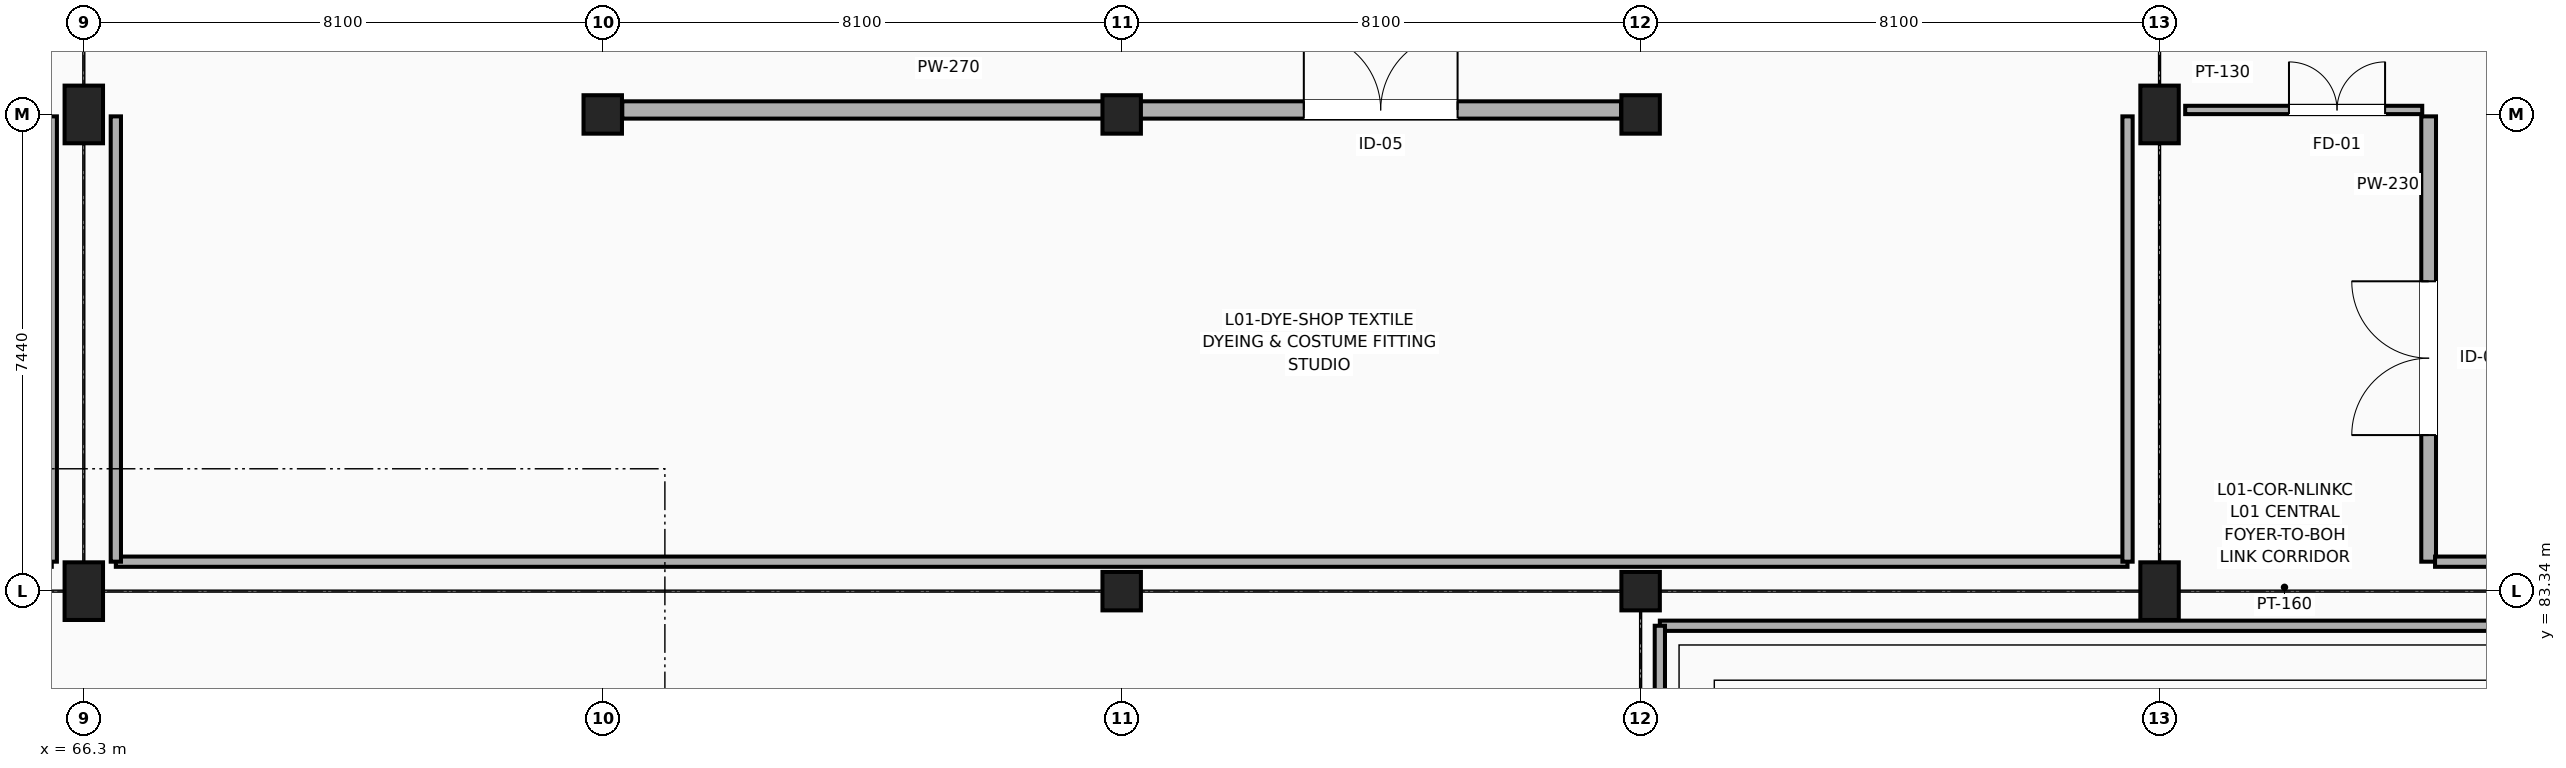
"""IFC4 building model, lengths in metres.
Left out: names, types, materials, properties, quantities, classifications, styles, units other than length and angle.
Written with IfcOpenShell. Run it as: python <this file> out.ifc"""

import sys

from ifc_helpers import new_model, si_unit, direction, frame, frame_2d, origin, origin_2d, place, context, subcontext, project, spatial, rectangle, extrude, element, fill, save


model = new_model("IFC4")
c1 = context("Model", 3, precision=1e-05, world=origin(), true_north=direction((0.0, 1.0)))
c2 = subcontext(c1, "Body", "Model", "MODEL_VIEW")
j1 = project(units=[si_unit("LENGTHUNIT", "METRE"), si_unit("PLANEANGLEUNIT", "RADIAN")], contexts=[c1])
p1 = place(None, origin())
s1 = spatial("IfcSite", under=j1, at=p1, CompositionType="ELEMENT")
p2 = place(p1, origin())
s2 = spatial("IfcBuilding", under=s1, at=p2, CompositionType="ELEMENT")
p3 = place(p2, frame((0.0, 0.0, 5.4)))
s3 = spatial("IfcBuildingStorey", under=s2, at=p3, CompositionType="ELEMENT", Elevation=5.4)
for number, where, z_axis, x_axis in (
    (1, (66.3, 83.34, 0.0), (0.0, 0.0, 1.0), (1.0, 0.0, 0.0)),
    (2, (66.3, 90.78, 0.0), (0.0, 0.0, 1.0), (1.0, 0.0, 0.0)),
):
    element("IfcColumn", number, at=place(p3, frame(where, z_axis=z_axis, x_axis=x_axis)), inside=s3, PredefinedType="COLUMN", context=c2, shape_type="SweptSolid", body=[
        extrude(rectangle(XDim=0.6, YDim=0.9, at=origin_2d()), origin(), (0.0, 0.0, 1.0), 4.8),
    ])
for number, where, z_axis, x_axis in (
    (3, (74.4, 90.78, 0.0), (0.0, 0.0, 1.0), (1.0, 0.0, 0.0)),
    (4, (82.5, 83.34, 0.0), (0.0, 0.0, 1.0), (1.0, 0.0, 0.0)),
    (5, (82.5, 90.78, 0.0), (0.0, 0.0, 1.0), (1.0, 0.0, 0.0)),
    (6, (90.6, 83.34, 0.0), (0.0, 0.0, 1.0), (1.0, 0.0, 0.0)),
    (7, (90.6, 90.78, 0.0), (0.0, 0.0, 1.0), (1.0, 0.0, 0.0)),
):
    element("IfcColumn", number, at=place(p3, frame(where, z_axis=z_axis, x_axis=x_axis)), inside=s3, PredefinedType="COLUMN", context=c2, shape_type="SweptSolid", body=[
        extrude(rectangle(XDim=0.6, YDim=0.6, at=origin_2d()), origin(), (0.0, 0.0, 1.0), 4.8),
    ])
for number, where, z_axis, x_axis in (
    (8, (98.7, 83.34, 0.0), (0.0, 0.0, 1.0), (1.0, 0.0, 0.0)),
    (9, (98.7, 90.78, 0.0), (0.0, 0.0, 1.0), (1.0, 0.0, 0.0)),
):
    element("IfcColumn", number, at=place(p3, frame(where, z_axis=z_axis, x_axis=x_axis)), inside=s3, PredefinedType="COLUMN", context=c2, shape_type="SweptSolid", body=[
        extrude(rectangle(XDim=0.6, YDim=0.9, at=origin_2d()), origin(), (0.0, 0.0, 1.0), 4.8),
    ])
p4 = place(p3, frame((99.1, 90.85, 0.0), z_axis=(0.0, 0.0, 1.0), x_axis=(1.0, 0.0, 0.0)))
e10 = element("IfcWall", 10, at=p4, inside=s3, PredefinedType="PARTITIONING", context=c2, shape_type="SweptSolid", body=[
    extrude(rectangle(XDim=3.7, YDim=0.13, at=frame_2d((1.85, 0.0))), origin(), (0.0, 0.0, 1.0), 3.987),
])
p5 = place(p4, frame((1.62, 0.0, 0.0)))
e11 = element("IfcOpeningElement", 11, at=p5, cuts=e10, PredefinedType="OPENING", context=c2, shape_type="SweptSolid", body=[
    extrude(rectangle(XDim=1.5, YDim=2.2, at=frame_2d((0.75, 1.1))), frame((0.0, 0.075, 0.0), z_axis=(0.0, -1.0, 0.0), x_axis=(1.0, 0.0, 0.0)), (0.0, 0.0, 1.0), 0.15),
])
p6 = place(p3, frame((102.9, 83.8, 0.0), z_axis=(0.0, 0.0, 1.0), x_axis=(0.0, 1.0, 0.0)))
e12 = element("IfcWall", 12, at=p6, inside=s3, PredefinedType="SOLIDWALL", context=c2, shape_type="SweptSolid", body=[
    extrude(rectangle(XDim=6.95, YDim=0.23, at=frame_2d((3.475, 0.0))), origin(), (0.0, 0.0, 1.0), 3.987),
])
p7 = place(p6, frame((1.976, 0.0, 0.0)))
e13 = element("IfcOpeningElement", 13, at=p7, cuts=e12, PredefinedType="OPENING", context=c2, shape_type="SweptSolid", body=[
    extrude(rectangle(XDim=2.4, YDim=2.8, at=frame_2d((1.2, 1.4))), frame((0.0, 0.125, 0.0), z_axis=(0.0, -1.0, 0.0), x_axis=(1.0, 0.0, 0.0)), (0.0, 0.0, 1.0), 0.25),
])
p8 = place(p3, frame((74.705, 90.85, 0.0), z_axis=(0.0, 0.0, 1.0), x_axis=(1.0, 0.0, 0.0)))
e14 = element("IfcWall", 14, at=p8, inside=s3, PredefinedType="SOLIDWALL", context=c2, shape_type="SweptSolid", body=[
    extrude(rectangle(XDim=15.59, YDim=0.27, at=frame_2d((7.795, 0.0))), origin(), (0.0, 0.0, 1.0), 3.687),
])
p9 = place(p8, frame((10.638, 0.0, 0.0)))
e15 = element("IfcOpeningElement", 15, at=p9, cuts=e14, PredefinedType="OPENING", context=c2, shape_type="SweptSolid", body=[
    extrude(rectangle(XDim=2.4, YDim=2.8, at=frame_2d((1.2, 1.4))), frame((0.0, 0.145, 0.0), z_axis=(0.0, -1.0, 0.0), x_axis=(1.0, 0.0, 0.0)), (0.0, 0.0, 1.0), 0.29),
])
p10 = place(p3, frame((90.9, 82.8, 0.0), z_axis=(0.0, 0.0, 1.0), x_axis=(1.0, 0.0, 0.0)))
e16 = element("IfcWall", 16, at=p10, inside=s3, PredefinedType="PARTITIONING", context=c2, shape_type="SweptSolid", body=[
    extrude(rectangle(XDim=19.5, YDim=0.16, at=frame_2d((9.75, 0.0))), origin(), (0.0, 0.0, 1.0), 4.127),
])
p11 = place(p3, frame((90.9, 68.78, 0.0), z_axis=(0.0, 0.0, 1.0), x_axis=(0.0, 1.0, 0.0)))
e17 = element("IfcWall", 17, at=p11, inside=s3, PredefinedType="PARTITIONING", context=c2, shape_type="SweptSolid", body=[
    extrude(rectangle(XDim=14.02, YDim=0.16, at=frame_2d((7.01, 0.0))), origin(), (0.0, 0.0, 1.0), 3.687),
])
p12 = place(p3, frame((65.8, 83.8, 0.0), z_axis=(0.0, 0.0, 1.0), x_axis=(0.0, 1.0, 0.0)))
e18 = element("IfcWall", 18, at=p12, inside=s3, PredefinedType="PARTITIONING", context=c2, shape_type="SweptSolid", body=[
    extrude(rectangle(XDim=6.95, YDim=0.16, at=frame_2d((3.475, 0.0))), origin(), (0.0, 0.0, 1.0), 3.687),
])
p13 = place(p3, frame((66.8, 83.8, 0.0), z_axis=(0.0, 0.0, 1.0), x_axis=(1.0, 0.0, 0.0)))
e19 = element("IfcWall", 19, at=p13, inside=s3, PredefinedType="PARTITIONING", context=c2, shape_type="SweptSolid", body=[
    extrude(rectangle(XDim=31.4, YDim=0.16, at=frame_2d((15.7, 0.0))), origin(), (0.0, 0.0, 1.0), 3.287),
])
p14 = place(p3, frame((66.8, 83.8, 0.0), z_axis=(0.0, 0.0, 1.0), x_axis=(0.0, 1.0, 0.0)))
e20 = element("IfcWall", 20, at=p14, inside=s3, PredefinedType="PARTITIONING", context=c2, shape_type="SweptSolid", body=[
    extrude(rectangle(XDim=6.95, YDim=0.16, at=frame_2d((3.475, 0.0))), origin(), (0.0, 0.0, 1.0), 3.987),
])
p15 = place(p3, frame((98.2, 83.8, 0.0), z_axis=(0.0, 0.0, 1.0), x_axis=(0.0, 1.0, 0.0)))
e21 = element("IfcWall", 21, at=p15, inside=s3, PredefinedType="PARTITIONING", context=c2, shape_type="SweptSolid", body=[
    extrude(rectangle(XDim=6.95, YDim=0.16, at=frame_2d((3.475, 0.0))), origin(), (0.0, 0.0, 1.0), 3.687),
])
p16 = place(p3, frame((103.0, 83.8, 0.0), z_axis=(0.0, 0.0, 1.0), x_axis=(1.0, 0.0, 0.0)))
e22 = element("IfcWall", 22, at=p16, inside=s3, PredefinedType="PARTITIONING", context=c2, shape_type="SweptSolid", body=[
    extrude(rectangle(XDim=27.7, YDim=0.16, at=frame_2d((13.85, 0.0))), origin(), (0.0, 0.0, 1.0), 3.837),
])
p17 = place(p5, origin())
e23 = element("IfcDoor", 23, at=p17, inside=s3, OperationType="DOUBLE_DOOR_SINGLE_SWING", PredefinedType="DOOR", context=c2, shape_type="SweptSolid", body=[
    extrude(rectangle(XDim=1.5, YDim=2.2, at=frame_2d((0.75, 1.1))), frame((0.0, 0.025, 0.0), z_axis=(0.0, -1.0, 0.0), x_axis=(1.0, 0.0, 0.0)), (0.0, 0.0, 1.0), 0.05),
])
fill(e11, e23)
p18 = place(p7, origin())
e24 = element("IfcDoor", 24, at=p18, inside=s3, OperationType="DOUBLE_DOOR_SINGLE_SWING", PredefinedType="DOOR", context=c2, shape_type="SweptSolid", body=[
    extrude(rectangle(XDim=2.4, YDim=2.8, at=frame_2d((1.2, 1.4))), frame((0.0, 0.025, 0.0), z_axis=(0.0, -1.0, 0.0), x_axis=(1.0, 0.0, 0.0)), (0.0, 0.0, 1.0), 0.05),
])
fill(e13, e24)
p19 = place(p9, origin())
e25 = element("IfcDoor", 25, at=p19, inside=s3, OperationType="DOUBLE_DOOR_SINGLE_SWING", PredefinedType="DOOR", context=c2, shape_type="SweptSolid", body=[
    extrude(rectangle(XDim=2.4, YDim=2.8, at=frame_2d((1.2, 1.4))), frame((0.0, 0.025, 0.0), z_axis=(0.0, -1.0, 0.0), x_axis=(1.0, 0.0, 0.0)), (0.0, 0.0, 1.0), 0.05),
])
fill(e15, e25)
save(model, sys.argv[1])
